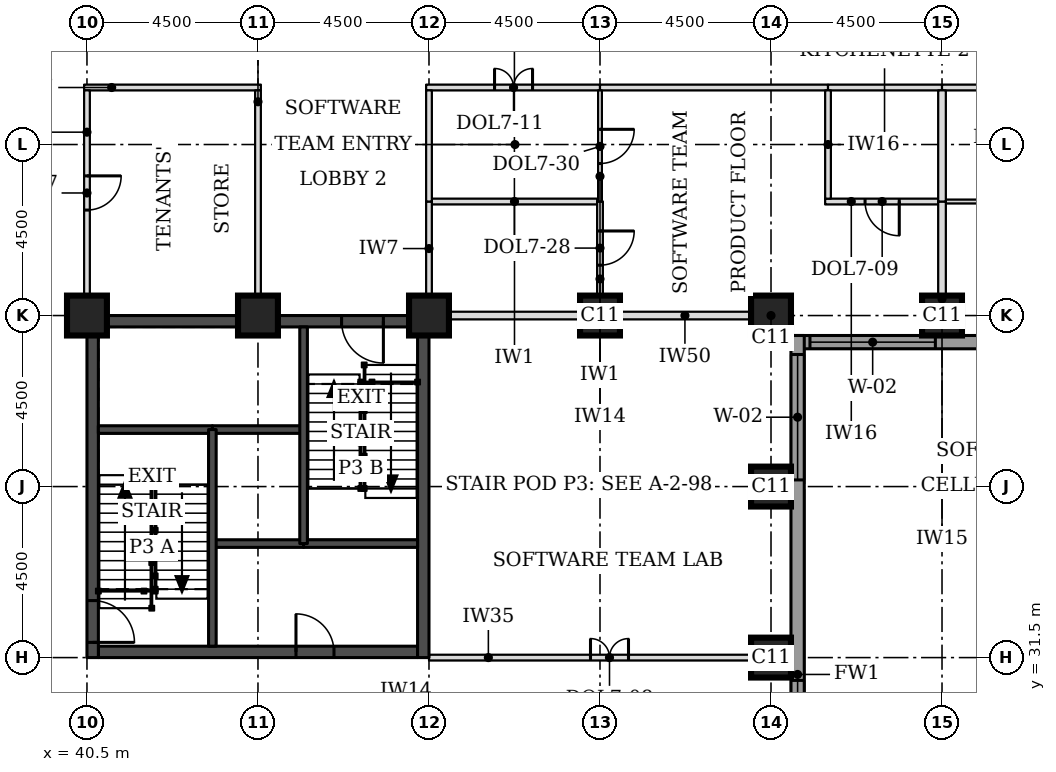
"""IFC4 building model, lengths in metres.
Left out: names, types, materials, properties, quantities, classifications, styles, units other than length and angle.
Written with IfcOpenShell. Run it as: python <this file> out.ifc"""

import sys

from ifc_helpers import new_model, si_unit, direction, frame, frame_2d, origin, origin_2d, place, context, subcontext, project, spatial, rectangle, extrude, element, fill, save


model = new_model("IFC4")
c1 = context("Model", 3, precision=1e-05, world=origin(), true_north=direction((0.0, 1.0)))
c2 = subcontext(c1, "Body", "Model", "MODEL_VIEW")
j1 = project(units=[si_unit("LENGTHUNIT", "METRE"), si_unit("PLANEANGLEUNIT", "RADIAN")], contexts=[c1])
p1 = place(None, origin())
s1 = spatial("IfcSite", under=j1, at=p1, CompositionType="ELEMENT")
p2 = place(p1, origin())
s2 = spatial("IfcBuilding", under=s1, at=p2, CompositionType="ELEMENT")
p3 = place(p2, frame((0.0, 0.0, 127.0)))
s3 = spatial("IfcBuildingStorey", under=s2, at=p3, CompositionType="ELEMENT", Elevation=127.0)
for number, where, z_axis, x_axis in (
    (1, (58.5, 31.5, 0.0), (0.0, 0.0, 1.0), (1.0, 0.0, 0.0)),
    (2, (58.5, 36.0, 0.0), (0.0, 0.0, 1.0), (1.0, 0.0, 0.0)),
    (3, (40.5, 40.5, 0.0), (0.0, 0.0, 1.0), (1.0, 0.0, 0.0)),
    (4, (45.0, 40.5, 0.0), (0.0, 0.0, 1.0), (1.0, 0.0, 0.0)),
    (5, (49.5, 40.5, 0.0), (0.0, 0.0, 1.0), (1.0, 0.0, 0.0)),
    (6, (54.0, 40.5, 0.0), (0.0, 0.0, 1.0), (1.0, 0.0, 0.0)),
    (7, (58.5, 40.5, 0.0), (0.0, 0.0, 1.0), (1.0, 0.0, 0.0)),
    (8, (63.0, 40.5, 0.0), (0.0, 0.0, 1.0), (1.0, 0.0, 0.0)),
):
    element("IfcColumn", number, at=place(p3, frame(where, z_axis=z_axis, x_axis=x_axis)), inside=s3, PredefinedType="COLUMN", context=c2, shape_type="SweptSolid", body=[
        extrude(rectangle(XDim=1.05, YDim=1.05, at=origin_2d()), origin(), (0.0, 0.0, 1.0), 3.7),
    ])
p4 = place(p3, frame((40.8, 31.65, 0.0), z_axis=(0.0, 0.0, 1.0), x_axis=(1.0, 0.0, 0.0)))
e9 = element("IfcWall", 9, at=p4, inside=s3, PredefinedType="SHEAR", context=c2, shape_type="SweptSolid", body=[
    extrude(rectangle(XDim=8.4, YDim=0.3, at=frame_2d((4.2, 0.0))), origin(), (0.0, 0.0, 1.0), 3.7),
])
p5 = place(p4, frame((5.2, 0.0, 0.0)))
e10 = element("IfcOpeningElement", 10, at=p5, cuts=e9, PredefinedType="OPENING", context=c2, shape_type="SweptSolid", body=[
    extrude(rectangle(XDim=1.0, YDim=2.1, at=frame_2d((0.5, 1.05))), frame((0.0, 0.16, 0.0), z_axis=(0.0, -1.0, 0.0), x_axis=(1.0, 0.0, 0.0)), (0.0, 0.0, 1.0), 0.32),
])
p6 = place(p3, frame((40.8, 40.35, 0.0), z_axis=(0.0, 0.0, 1.0), x_axis=(1.0, 0.0, 0.0)))
e11 = element("IfcWall", 11, at=p6, inside=s3, PredefinedType="SHEAR", context=c2, shape_type="SweptSolid", body=[
    extrude(rectangle(XDim=8.4, YDim=0.3, at=frame_2d((4.2, 0.0))), origin(), (0.0, 0.0, 1.0), 3.7),
])
p7 = place(p6, frame((6.4, 0.0, 0.0)))
e12 = element("IfcOpeningElement", 12, at=p7, cuts=e11, PredefinedType="OPENING", context=c2, shape_type="SweptSolid", body=[
    extrude(rectangle(XDim=1.1, YDim=2.1, at=frame_2d((0.55, 1.05))), frame((0.0, 0.16, 0.0), z_axis=(0.0, -1.0, 0.0), x_axis=(1.0, 0.0, 0.0)), (0.0, 0.0, 1.0), 0.32),
])
p8 = place(p3, frame((40.65, 31.5, 0.0), z_axis=(0.0, 0.0, 1.0), x_axis=(0.0, 1.0, 0.0)))
e13 = element("IfcWall", 13, at=p8, inside=s3, PredefinedType="SHEAR", context=c2, shape_type="SweptSolid", body=[
    extrude(rectangle(XDim=9.0, YDim=0.3, at=frame_2d((4.5, 0.0))), origin(), (0.0, 0.0, 1.0), 3.7),
])
p9 = place(p8, frame((0.4, 0.0, 0.0)))
e14 = element("IfcOpeningElement", 14, at=p9, cuts=e13, PredefinedType="OPENING", context=c2, shape_type="SweptSolid", body=[
    extrude(rectangle(XDim=1.1, YDim=2.1, at=frame_2d((0.55, 1.05))), frame((0.0, 0.16, 0.0), z_axis=(0.0, -1.0, 0.0), x_axis=(1.0, 0.0, 0.0)), (0.0, 0.0, 1.0), 0.32),
])
p10 = place(p3, frame((49.35, 31.5, 0.0), z_axis=(0.0, 0.0, 1.0), x_axis=(0.0, 1.0, 0.0)))
e15 = element("IfcWall", 15, at=p10, inside=s3, PredefinedType="SHEAR", context=c2, shape_type="SweptSolid", body=[
    extrude(rectangle(XDim=9.0, YDim=0.3, at=frame_2d((4.5, 0.0))), origin(), (0.0, 0.0, 1.0), 3.7),
])
p11 = place(p3, frame((59.025, 39.8, 0.0), z_axis=(0.0, 0.0, 1.0), x_axis=(1.0, 0.0, 0.0)))
e16 = element("IfcWall", 16, at=p11, inside=s3, PredefinedType="STANDARD", context=c2, shape_type="SweptSolid", body=[
    extrude(rectangle(XDim=13.337, YDim=0.35, at=frame_2d((6.669, 0.0))), origin(), (0.0, 0.0, 1.0), 3.525),
])
p12 = place(p11, frame((0.5, 0.0, 0.9)))
e17 = element("IfcOpeningElement", 17, at=p12, cuts=e16, PredefinedType="OPENING", context=c2, shape_type="SweptSolid", body=[
    extrude(rectangle(XDim=3.3, YDim=1.9, at=frame_2d((1.65, 0.95))), frame((0.0, 0.185, 0.0), z_axis=(0.0, -1.0, 0.0), x_axis=(1.0, 0.0, 0.0)), (0.0, 0.0, 1.0), 0.37),
])
p13 = place(p3, frame((59.2, 22.138, 0.0), z_axis=(0.0, 0.0, 1.0), x_axis=(0.0, 1.0, 0.0)))
e18 = element("IfcWall", 18, at=p13, inside=s3, PredefinedType="STANDARD", context=c2, shape_type="SweptSolid", body=[
    extrude(rectangle(XDim=17.837, YDim=0.35, at=frame_2d((8.919, 0.0))), origin(), (0.0, 0.0, 1.0), 3.525),
])
p14 = place(p13, frame((5.462, 0.0, 0.9)))
e19 = element("IfcOpeningElement", 19, at=p14, cuts=e18, PredefinedType="OPENING", context=c2, shape_type="SweptSolid", body=[
    extrude(rectangle(XDim=3.3, YDim=1.9, at=frame_2d((1.65, 0.95))), frame((0.0, 0.185, 0.0), z_axis=(0.0, -1.0, 0.0), x_axis=(1.0, 0.0, 0.0)), (0.0, 0.0, 1.0), 0.37),
])
p15 = place(p13, frame((14.037, 0.0, 0.9)))
e20 = element("IfcOpeningElement", 20, at=p15, cuts=e18, PredefinedType="OPENING", context=c2, shape_type="SweptSolid", body=[
    extrude(rectangle(XDim=3.3, YDim=1.9, at=frame_2d((1.65, 0.95))), frame((0.0, 0.185, 0.0), z_axis=(0.0, -1.0, 0.0), x_axis=(1.0, 0.0, 0.0)), (0.0, 0.0, 1.0), 0.37),
])
p16 = place(p3, frame((49.5, 31.5, 0.0), z_axis=(0.0, 0.0, 1.0), x_axis=(1.0, 0.0, 0.0)))
e21 = element("IfcWall", 21, at=p16, inside=s3, PredefinedType="PARTITIONING", context=c2, shape_type="SweptSolid", body=[
    extrude(rectangle(XDim=9.525, YDim=0.15, at=frame_2d((4.762, 0.0))), origin(), (0.0, 0.0, 1.0), 2.55),
])
p17 = place(p16, frame((4.25, 0.0, 0.0)))
e22 = element("IfcOpeningElement", 22, at=p17, cuts=e21, PredefinedType="OPENING", context=c2, shape_type="SweptSolid", body=[
    extrude(rectangle(XDim=1.0, YDim=2.1, at=frame_2d((0.5, 1.05))), frame((0.0, 0.085, 0.0), z_axis=(0.0, -1.0, 0.0), x_axis=(1.0, 0.0, 0.0)), (0.0, 0.0, 1.0), 0.17),
])
p18 = place(p3, frame((50.015, 40.5, 0.0), z_axis=(0.0, 0.0, 1.0), x_axis=(1.0, 0.0, 0.0)))
e23 = element("IfcWall", 23, at=p18, inside=s3, PredefinedType="PARTITIONING", context=c2, shape_type="SweptSolid", body=[
    extrude(rectangle(XDim=3.46, YDim=0.2, at=frame_2d((1.73, 0.0))), origin(), (0.0, 0.0, 1.0), 2.8),
])
p19 = place(p3, frame((54.495, 40.5, 0.0), z_axis=(0.0, 0.0, 1.0), x_axis=(1.0, 0.0, 0.0)))
e24 = element("IfcWall", 24, at=p19, inside=s3, PredefinedType="PARTITIONING", context=c2, shape_type="SweptSolid", body=[
    extrude(rectangle(XDim=3.48, YDim=0.2, at=frame_2d((1.74, 0.0))), origin(), (0.0, 0.0, 1.0), 2.8),
])
p20 = place(p3, frame((49.575, 43.5, 0.0), z_axis=(0.0, 0.0, 1.0), x_axis=(1.0, 0.0, 0.0)))
e25 = element("IfcWall", 25, at=p20, inside=s3, PredefinedType="PARTITIONING", context=c2, shape_type="SweptSolid", body=[
    extrude(rectangle(XDim=4.35, YDim=0.15, at=frame_2d((2.175, 0.0))), origin(), (0.0, 0.0, 1.0), 3.55),
])
p21 = place(p3, frame((59.925, 43.5, 0.0), z_axis=(0.0, 0.0, 1.0), x_axis=(1.0, 0.0, 0.0)))
e26 = element("IfcWall", 26, at=p21, inside=s3, PredefinedType="PARTITIONING", context=c2, shape_type="SweptSolid", body=[
    extrude(rectangle(XDim=2.975, YDim=0.15, at=frame_2d((1.487, 0.0))), origin(), (0.0, 0.0, 1.0), 3.55),
])
p22 = place(p21, frame((1.05, 0.0, 0.0)))
e27 = element("IfcOpeningElement", 27, at=p22, cuts=e26, PredefinedType="OPENING", context=c2, shape_type="SweptSolid", body=[
    extrude(rectangle(XDim=0.9, YDim=2.1, at=frame_2d((0.45, 1.05))), frame((0.0, 0.085, 0.0), z_axis=(0.0, -1.0, 0.0), x_axis=(1.0, 0.0, 0.0)), (0.0, 0.0, 1.0), 0.17),
])
p23 = place(p3, frame((63.1, 43.5, 0.0), z_axis=(0.0, 0.0, 1.0), x_axis=(1.0, 0.0, 0.0)))
e28 = element("IfcWall", 28, at=p23, inside=s3, PredefinedType="PARTITIONING", context=c2, shape_type="SweptSolid", body=[
    extrude(rectangle(XDim=4.4, YDim=0.1, at=frame_2d((2.2, 0.0))), origin(), (0.0, 0.0, 1.0), 3.55),
])
p24 = place(p23, frame((1.75, 0.0, 0.0)))
e29 = element("IfcOpeningElement", 29, at=p24, cuts=e28, PredefinedType="OPENING", context=c2, shape_type="SweptSolid", body=[
    extrude(rectangle(XDim=0.9, YDim=2.1, at=frame_2d((0.45, 1.05))), frame((0.0, 0.06, 0.0), z_axis=(0.0, -1.0, 0.0), x_axis=(1.0, 0.0, 0.0)), (0.0, 0.0, 1.0), 0.12),
])
p25 = place(p3, frame((40.425, 46.5, 0.0), z_axis=(0.0, 0.0, 1.0), x_axis=(1.0, 0.0, 0.0)))
e30 = element("IfcWall", 30, at=p25, inside=s3, PredefinedType="PARTITIONING", context=c2, shape_type="SweptSolid", body=[
    extrude(rectangle(XDim=4.65, YDim=0.15, at=frame_2d((2.325, 0.0))), origin(), (0.0, 0.0, 1.0), 3.55),
])
p26 = place(p3, frame((49.425, 46.5, 0.0), z_axis=(0.0, 0.0, 1.0), x_axis=(1.0, 0.0, 0.0)))
e31 = element("IfcWall", 31, at=p26, inside=s3, PredefinedType="PARTITIONING", context=c2, shape_type="SweptSolid", body=[
    extrude(rectangle(XDim=4.575, YDim=0.15, at=frame_2d((2.288, 0.0))), origin(), (0.0, 0.0, 1.0), 3.55),
])
p27 = place(p26, frame((1.8, 0.0, 0.0)))
e32 = element("IfcOpeningElement", 32, at=p27, cuts=e31, PredefinedType="OPENING", context=c2, shape_type="SweptSolid", body=[
    extrude(rectangle(XDim=1.0, YDim=2.1, at=frame_2d((0.5, 1.05))), frame((0.0, 0.085, 0.0), z_axis=(0.0, -1.0, 0.0), x_axis=(1.0, 0.0, 0.0)), (0.0, 0.0, 1.0), 0.17),
])
p28 = place(p3, frame((54.0, 46.5, 0.0), z_axis=(0.0, 0.0, 1.0), x_axis=(1.0, 0.0, 0.0)))
e33 = element("IfcWall", 33, at=p28, inside=s3, PredefinedType="PARTITIONING", context=c2, shape_type="SweptSolid", body=[
    extrude(rectangle(XDim=6.0, YDim=0.15, at=frame_2d((3.0, 0.0))), origin(), (0.0, 0.0, 1.0), 3.55),
])
p29 = place(p3, frame((60.0, 46.5, 0.0), z_axis=(0.0, 0.0, 1.0), x_axis=(1.0, 0.0, 0.0)))
e34 = element("IfcWall", 34, at=p29, inside=s3, PredefinedType="PARTITIONING", context=c2, shape_type="SweptSolid", body=[
    extrude(rectangle(XDim=3.0, YDim=0.15, at=frame_2d((1.5, 0.0))), origin(), (0.0, 0.0, 1.0), 3.55),
])
p30 = place(p3, frame((63.0, 46.5, 0.0), z_axis=(0.0, 0.0, 1.0), x_axis=(1.0, 0.0, 0.0)))
e35 = element("IfcWall", 35, at=p30, inside=s3, PredefinedType="PARTITIONING", context=c2, shape_type="SweptSolid", body=[
    extrude(rectangle(XDim=7.5, YDim=0.15, at=frame_2d((3.75, 0.0))), origin(), (0.0, 0.0, 1.0), 3.55),
])
p31 = place(p30, frame((3.25, 0.0, 0.0)))
e36 = element("IfcOpeningElement", 36, at=p31, cuts=e35, PredefinedType="OPENING", context=c2, shape_type="SweptSolid", body=[
    extrude(rectangle(XDim=1.0, YDim=2.1, at=frame_2d((0.5, 1.05))), frame((0.0, 0.085, 0.0), z_axis=(0.0, -1.0, 0.0), x_axis=(1.0, 0.0, 0.0)), (0.0, 0.0, 1.0), 0.17),
])
p32 = place(p3, frame((63.0, 39.975, 0.0), z_axis=(0.0, 0.0, 1.0), x_axis=(0.0, 1.0, 0.0)))
e37 = element("IfcWall", 37, at=p32, inside=s3, PredefinedType="PARTITIONING", context=c2, shape_type="SweptSolid", body=[
    extrude(rectangle(XDim=3.525, YDim=0.2, at=frame_2d((1.762, 0.0))), origin(), (0.0, 0.0, 1.0), 3.55),
])
p33 = place(p3, frame((40.5, 41.025, 0.0), z_axis=(0.0, 0.0, 1.0), x_axis=(0.0, 1.0, 0.0)))
e38 = element("IfcWall", 38, at=p33, inside=s3, PredefinedType="PARTITIONING", context=c2, shape_type="SweptSolid", body=[
    extrude(rectangle(XDim=5.4, YDim=0.15, at=frame_2d((2.7, 0.0))), origin(), (0.0, 0.0, 1.0), 3.55),
])
p34 = place(p33, frame((2.25, 0.0, 0.0)))
e39 = element("IfcOpeningElement", 39, at=p34, cuts=e38, PredefinedType="OPENING", context=c2, shape_type="SweptSolid", body=[
    extrude(rectangle(XDim=0.9, YDim=2.1, at=frame_2d((0.45, 1.05))), frame((0.0, 0.085, 0.0), z_axis=(0.0, -1.0, 0.0), x_axis=(1.0, 0.0, 0.0)), (0.0, 0.0, 1.0), 0.17),
])
p35 = place(p3, frame((45.0, 41.025, 0.0), z_axis=(0.0, 0.0, 1.0), x_axis=(0.0, 1.0, 0.0)))
e40 = element("IfcWall", 40, at=p35, inside=s3, PredefinedType="PARTITIONING", context=c2, shape_type="SweptSolid", body=[
    extrude(rectangle(XDim=5.4, YDim=0.15, at=frame_2d((2.7, 0.0))), origin(), (0.0, 0.0, 1.0), 3.55),
])
p36 = place(p3, frame((49.5, 41.025, 0.0), z_axis=(0.0, 0.0, 1.0), x_axis=(0.0, 1.0, 0.0)))
e41 = element("IfcWall", 41, at=p36, inside=s3, PredefinedType="PARTITIONING", context=c2, shape_type="SweptSolid", body=[
    extrude(rectangle(XDim=2.475, YDim=0.15, at=frame_2d((1.238, 0.0))), origin(), (0.0, 0.0, 1.0), 3.55),
])
p37 = place(p3, frame((54.0, 41.025, 0.0), z_axis=(0.0, 0.0, 1.0), x_axis=(0.0, 1.0, 0.0)))
e42 = element("IfcWall", 42, at=p37, inside=s3, PredefinedType="PARTITIONING", context=c2, shape_type="SweptSolid", body=[
    extrude(rectangle(XDim=2.475, YDim=0.15, at=frame_2d((1.238, 0.0))), origin(), (0.0, 0.0, 1.0), 3.55),
])
p38 = place(p37, frame((0.8, 0.0, 0.0)))
e43 = element("IfcOpeningElement", 43, at=p38, cuts=e42, PredefinedType="OPENING", context=c2, shape_type="SweptSolid", body=[
    extrude(rectangle(XDim=0.9, YDim=2.1, at=frame_2d((0.45, 1.05))), frame((0.0, 0.085, 0.0), z_axis=(0.0, -1.0, 0.0), x_axis=(1.0, 0.0, 0.0)), (0.0, 0.0, 1.0), 0.17),
])
p39 = place(p3, frame((49.5, 43.5, 0.0), z_axis=(0.0, 0.0, 1.0), x_axis=(0.0, 1.0, 0.0)))
e44 = element("IfcWall", 44, at=p39, inside=s3, PredefinedType="PARTITIONING", context=c2, shape_type="SweptSolid", body=[
    extrude(rectangle(XDim=2.925, YDim=0.15, at=frame_2d((1.462, 0.0))), origin(), (0.0, 0.0, 1.0), 3.55),
])
p40 = place(p3, frame((54.0, 43.5, 0.0), z_axis=(0.0, 0.0, 1.0), x_axis=(0.0, 1.0, 0.0)))
e45 = element("IfcWall", 45, at=p40, inside=s3, PredefinedType="PARTITIONING", context=c2, shape_type="SweptSolid", body=[
    extrude(rectangle(XDim=2.925, YDim=0.1, at=frame_2d((1.462, 0.0))), origin(), (0.0, 0.0, 1.0), 3.55),
])
p41 = place(p40, frame((1.0, 0.0, 0.0)))
e46 = element("IfcOpeningElement", 46, at=p41, cuts=e45, PredefinedType="OPENING", context=c2, shape_type="SweptSolid", body=[
    extrude(rectangle(XDim=0.9, YDim=2.1, at=frame_2d((0.45, 1.05))), frame((0.0, 0.06, 0.0), z_axis=(0.0, -1.0, 0.0), x_axis=(1.0, 0.0, 0.0)), (0.0, 0.0, 1.0), 0.12),
])
p42 = place(p3, frame((63.0, 43.5, 0.0), z_axis=(0.0, 0.0, 1.0), x_axis=(0.0, 1.0, 0.0)))
e47 = element("IfcWall", 47, at=p42, inside=s3, PredefinedType="PARTITIONING", context=c2, shape_type="SweptSolid", body=[
    extrude(rectangle(XDim=2.925, YDim=0.2, at=frame_2d((1.462, 0.0))), origin(), (0.0, 0.0, 1.0), 3.55),
])
p43 = place(p3, frame((60.0, 43.575, 0.0), z_axis=(0.0, 0.0, 1.0), x_axis=(0.0, 1.0, 0.0)))
e48 = element("IfcWall", 48, at=p43, inside=s3, PredefinedType="PARTITIONING", context=c2, shape_type="SweptSolid", body=[
    extrude(rectangle(XDim=2.85, YDim=0.15, at=frame_2d((1.425, 0.0))), origin(), (0.0, 0.0, 1.0), 3.55),
])
p44 = place(p3, frame((43.8, 34.5, 0.0), z_axis=(0.0, 0.0, 1.0), x_axis=(1.0, 0.0, 0.0)))
e49 = element("IfcWall", 49, at=p44, inside=s3, PredefinedType="SOLIDWALL", context=c2, shape_type="SweptSolid", body=[
    extrude(rectangle(XDim=2.4, YDim=0.2, at=frame_2d((1.2, 0.0))), origin(), (0.0, 0.0, 1.0), 3.55),
])
p45 = place(p3, frame((46.2, 34.5, 0.0), z_axis=(0.0, 0.0, 1.0), x_axis=(1.0, 0.0, 0.0)))
e50 = element("IfcWall", 50, at=p45, inside=s3, PredefinedType="SOLIDWALL", context=c2, shape_type="SweptSolid", body=[
    extrude(rectangle(XDim=3.0, YDim=0.2, at=frame_2d((1.5, 0.0))), origin(), (0.0, 0.0, 1.0), 3.55),
])
p46 = place(p3, frame((43.8, 37.5, 0.0), z_axis=(0.0, 0.0, 1.0), x_axis=(1.0, 0.0, 0.0)))
e51 = element("IfcWall", 51, at=p46, inside=s3, PredefinedType="SOLIDWALL", context=c2, shape_type="SweptSolid", body=[
    extrude(rectangle(XDim=2.4, YDim=0.2, at=frame_2d((1.2, 0.0))), origin(), (0.0, 0.0, 1.0), 3.7),
])
p47 = place(p3, frame((40.8, 37.5, 0.0), z_axis=(0.0, 0.0, 1.0), x_axis=(1.0, 0.0, 0.0)))
e52 = element("IfcWall", 52, at=p47, inside=s3, PredefinedType="SOLIDWALL", context=c2, shape_type="SweptSolid", body=[
    extrude(rectangle(XDim=3.0, YDim=0.2, at=frame_2d((1.5, 0.0))), origin(), (0.0, 0.0, 1.0), 3.55),
])
for number, where, z_axis, x_axis in (
    (53, (43.8, 31.8, 0.0), (0.0, 0.0, 1.0), (0.0, 1.0, 0.0)),
    (54, (46.2, 34.5, 0.0), (0.0, 0.0, 1.0), (0.0, 1.0, 0.0)),
):
    element("IfcWall", number, at=place(p3, frame(where, z_axis=z_axis, x_axis=x_axis)), inside=s3, PredefinedType="SOLIDWALL", context=c2, shape_type="SweptSolid", body=[
        extrude(rectangle(XDim=5.7, YDim=0.2, at=frame_2d((2.85, 0.0))), origin(), (0.0, 0.0, 1.0), 3.55),
    ])
p48 = place(p12, origin())
e55 = element("IfcWindow", 55, at=p48, inside=s3, PartitioningType="SINGLE_PANEL", PredefinedType="WINDOW", context=c2, shape_type="SweptSolid", body=[
    extrude(rectangle(XDim=3.3, YDim=1.9, at=frame_2d((1.65, 0.95))), frame((0.0, 0.085, 0.0), z_axis=(0.0, -1.0, 0.0), x_axis=(1.0, 0.0, 0.0)), (0.0, 0.0, 1.0), 0.06),
])
fill(e17, e55)
p49 = place(p14, origin())
e56 = element("IfcWindow", 56, at=p49, inside=s3, PartitioningType="SINGLE_PANEL", PredefinedType="WINDOW", context=c2, shape_type="SweptSolid", body=[
    extrude(rectangle(XDim=3.3, YDim=1.9, at=frame_2d((1.65, 0.95))), frame((0.0, 0.085, 0.0), z_axis=(0.0, -1.0, 0.0), x_axis=(1.0, 0.0, 0.0)), (0.0, 0.0, 1.0), 0.06),
])
fill(e19, e56)
p50 = place(p15, origin())
e57 = element("IfcWindow", 57, at=p50, inside=s3, PartitioningType="SINGLE_PANEL", PredefinedType="WINDOW", context=c2, shape_type="SweptSolid", body=[
    extrude(rectangle(XDim=3.3, YDim=1.9, at=frame_2d((1.65, 0.95))), frame((0.0, 0.085, 0.0), z_axis=(0.0, -1.0, 0.0), x_axis=(1.0, 0.0, 0.0)), (0.0, 0.0, 1.0), 0.06),
])
fill(e20, e57)
p51 = place(p34, frame((0.9, 0.0, 0.0), z_axis=(0.0, 0.0, 1.0), x_axis=(-1.0, 0.0, 0.0)))
e58 = element("IfcDoor", 58, at=p51, inside=s3, OperationType="SINGLE_SWING_LEFT", PredefinedType="DOOR", context=c2, shape_type="SweptSolid", body=[
    extrude(rectangle(XDim=0.9, YDim=2.1, at=frame_2d((0.45, 1.05))), frame((0.0, 0.025, 0.0), z_axis=(0.0, -1.0, 0.0), x_axis=(1.0, 0.0, 0.0)), (0.0, 0.0, 1.0), 0.05),
])
fill(e39, e58)
p52 = place(p17, origin())
e59 = element("IfcDoor", 59, at=p52, inside=s3, OperationType="DOUBLE_DOOR_SINGLE_SWING", PredefinedType="DOOR", context=c2, shape_type="SweptSolid", body=[
    extrude(rectangle(XDim=1.0, YDim=2.1, at=frame_2d((0.5, 1.05))), frame((0.0, 0.025, 0.0), z_axis=(0.0, -1.0, 0.0), x_axis=(1.0, 0.0, 0.0)), (0.0, 0.0, 1.0), 0.05),
])
fill(e22, e59)
p53 = place(p27, origin())
e60 = element("IfcDoor", 60, at=p53, inside=s3, OperationType="DOUBLE_DOOR_SINGLE_SWING", PredefinedType="DOOR", context=c2, shape_type="SweptSolid", body=[
    extrude(rectangle(XDim=1.0, YDim=2.1, at=frame_2d((0.5, 1.05))), frame((0.0, 0.025, 0.0), z_axis=(0.0, -1.0, 0.0), x_axis=(1.0, 0.0, 0.0)), (0.0, 0.0, 1.0), 0.05),
])
fill(e32, e60)
p54 = place(p41, frame((0.9, 0.0, 0.0), z_axis=(0.0, 0.0, 1.0), x_axis=(-1.0, 0.0, 0.0)))
e61 = element("IfcDoor", 61, at=p54, inside=s3, OperationType="SINGLE_SWING_LEFT", PredefinedType="DOOR", context=c2, shape_type="SweptSolid", body=[
    extrude(rectangle(XDim=0.9, YDim=2.1, at=frame_2d((0.45, 1.05))), frame((0.0, 0.025, 0.0), z_axis=(0.0, -1.0, 0.0), x_axis=(1.0, 0.0, 0.0)), (0.0, 0.0, 1.0), 0.05),
])
fill(e46, e61)
p55 = place(p22, frame((0.9, 0.0, 0.0), z_axis=(0.0, 0.0, 1.0), x_axis=(-1.0, 0.0, 0.0)))
e62 = element("IfcDoor", 62, at=p55, inside=s3, OperationType="SINGLE_SWING_LEFT", PredefinedType="DOOR", context=c2, shape_type="SweptSolid", body=[
    extrude(rectangle(XDim=0.9, YDim=2.1, at=frame_2d((0.45, 1.05))), frame((0.0, 0.025, 0.0), z_axis=(0.0, -1.0, 0.0), x_axis=(1.0, 0.0, 0.0)), (0.0, 0.0, 1.0), 0.05),
])
fill(e27, e62)
p56 = place(p38, frame((0.9, 0.0, 0.0), z_axis=(0.0, 0.0, 1.0), x_axis=(-1.0, 0.0, 0.0)))
e63 = element("IfcDoor", 63, at=p56, inside=s3, OperationType="SINGLE_SWING_LEFT", PredefinedType="DOOR", context=c2, shape_type="SweptSolid", body=[
    extrude(rectangle(XDim=0.9, YDim=2.1, at=frame_2d((0.45, 1.05))), frame((0.0, 0.025, 0.0), z_axis=(0.0, -1.0, 0.0), x_axis=(1.0, 0.0, 0.0)), (0.0, 0.0, 1.0), 0.05),
])
fill(e43, e63)
p57 = place(p9, frame((1.1, 0.0, 0.0), z_axis=(0.0, 0.0, 1.0), x_axis=(-1.0, 0.0, 0.0)))
e64 = element("IfcDoor", 64, at=p57, inside=s3, OperationType="SINGLE_SWING_RIGHT", PredefinedType="DOOR", context=c2, shape_type="SweptSolid", body=[
    extrude(rectangle(XDim=1.1, YDim=2.1, at=frame_2d((0.55, 1.05))), frame((0.0, 0.025, 0.0), z_axis=(0.0, -1.0, 0.0), x_axis=(1.0, 0.0, 0.0)), (0.0, 0.0, 1.0), 0.05),
])
fill(e14, e64)
p58 = place(p7, frame((1.1, 0.0, 0.0), z_axis=(0.0, 0.0, 1.0), x_axis=(-1.0, 0.0, 0.0)))
e65 = element("IfcDoor", 65, at=p58, inside=s3, OperationType="SINGLE_SWING_LEFT", PredefinedType="DOOR", context=c2, shape_type="SweptSolid", body=[
    extrude(rectangle(XDim=1.1, YDim=2.1, at=frame_2d((0.55, 1.05))), frame((0.0, 0.025, 0.0), z_axis=(0.0, -1.0, 0.0), x_axis=(1.0, 0.0, 0.0)), (0.0, 0.0, 1.0), 0.05),
])
fill(e12, e65)
p59 = place(p5, origin())
e66 = element("IfcDoor", 66, at=p59, inside=s3, OperationType="SINGLE_SWING_LEFT", PredefinedType="DOOR", context=c2, shape_type="SweptSolid", body=[
    extrude(rectangle(XDim=1.0, YDim=2.1, at=frame_2d((0.5, 1.05))), frame((0.0, 0.025, 0.0), z_axis=(0.0, -1.0, 0.0), x_axis=(1.0, 0.0, 0.0)), (0.0, 0.0, 1.0), 0.05),
])
fill(e10, e66)
save(model, sys.argv[1])
